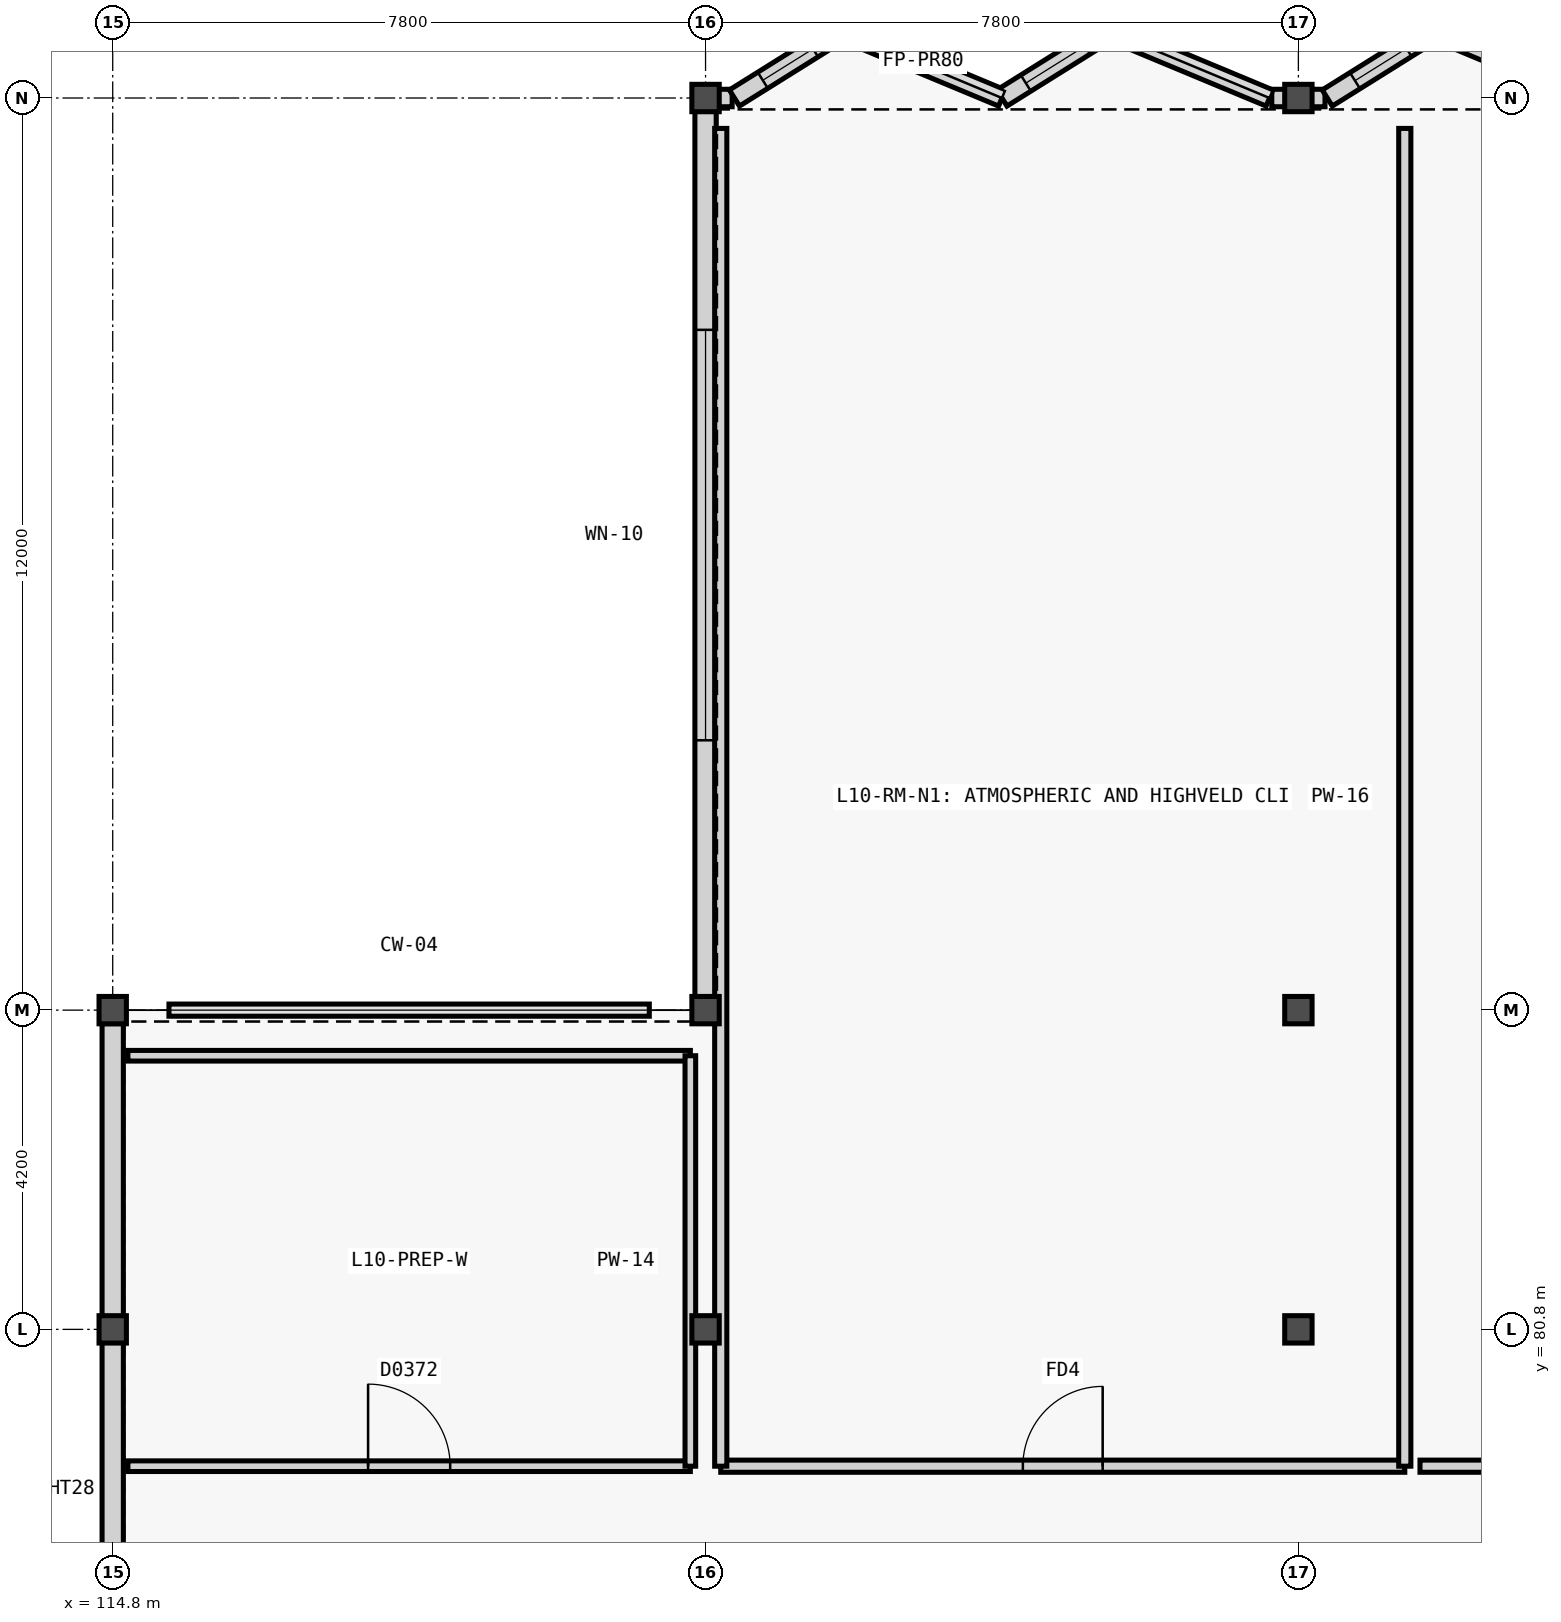
"""IFC4 building model, lengths in metres.
Left out: names, types, materials, properties, quantities, classifications, styles, units other than length and angle.
Written with IfcOpenShell. Run it as: python <this file> out.ifc"""

import sys

from ifc_helpers import new_model, si_unit, direction, frame, frame_2d, origin, origin_2d, place, context, subcontext, project, spatial, rectangle, extrude, element, fill, save


model = new_model("IFC4")
c1 = context("Model", 3, precision=1e-05, world=origin(), true_north=direction((0.0, 1.0)))
c2 = subcontext(c1, "Body", "Model", "MODEL_VIEW")
j1 = project(units=[si_unit("LENGTHUNIT", "METRE"), si_unit("PLANEANGLEUNIT", "RADIAN")], contexts=[c1])
p1 = place(None, origin())
s1 = spatial("IfcSite", under=j1, at=p1, CompositionType="ELEMENT")
p2 = place(p1, origin())
s2 = spatial("IfcBuilding", under=s1, at=p2, CompositionType="ELEMENT")
p3 = place(p2, frame((0.0, 0.0, 39.6)))
s3 = spatial("IfcBuildingStorey", under=s2, at=p3, CompositionType="ELEMENT", Elevation=39.6)
for number, where, z_axis, x_axis in (
    (1, (114.8, 80.8, 0.0), (0.0, 0.0, 1.0), (1.0, 0.0, 0.0)),
    (2, (114.8, 85.0, 0.0), (0.0, 0.0, 1.0), (1.0, 0.0, 0.0)),
    (3, (122.6, 80.8, 0.0), (0.0, 0.0, 1.0), (1.0, 0.0, 0.0)),
    (4, (122.6, 85.0, 0.0), (0.0, 0.0, 1.0), (1.0, 0.0, 0.0)),
    (5, (122.6, 97.0, 0.0), (0.0, 0.0, 1.0), (1.0, 0.0, 0.0)),
    (6, (130.4, 80.8, 0.0), (0.0, 0.0, 1.0), (1.0, 0.0, 0.0)),
    (7, (130.4, 85.0, 0.0), (0.0, 0.0, 1.0), (1.0, 0.0, 0.0)),
    (8, (130.4, 97.0, 0.0), (0.0, 0.0, 1.0), (1.0, 0.0, 0.0)),
):
    element("IfcColumn", number, at=place(p3, frame(where, z_axis=z_axis, x_axis=x_axis)), inside=s3, PredefinedType="COLUMN", context=c2, shape_type="SweptSolid", body=[
        extrude(rectangle(XDim=0.36, YDim=0.36, at=origin_2d()), origin(), (0.0, 0.0, 1.0), 3.6),
    ])
p4 = place(p3, frame((122.6, 85.178, 0.0), z_axis=(0.0, 0.0, 1.0), x_axis=(0.0, 1.0, 0.0)))
e9 = element("IfcWall", 9, at=p4, inside=s3, PredefinedType="SOLIDWALL", context=c2, shape_type="SweptSolid", body=[
    extrude(rectangle(XDim=11.644, YDim=0.28, at=frame_2d((5.822, 0.0))), origin(), (0.0, 0.0, 1.0), 2.89),
])
p5 = place(p4, frame((3.372, 0.0, 0.82)))
e10 = element("IfcOpeningElement", 10, at=p5, cuts=e9, PredefinedType="OPENING", context=c2, shape_type="SweptSolid", body=[
    extrude(rectangle(XDim=5.4, YDim=1.2, at=frame_2d((2.7, 0.6))), frame((0.0, 0.15, 0.0), z_axis=(0.0, -1.0, 0.0), x_axis=(1.0, 0.0, 0.0)), (0.0, 0.0, 1.0), 0.3),
])
p6 = place(p3, frame((114.8, 72.578, 0.0), z_axis=(0.0, 0.0, 1.0), x_axis=(0.0, 1.0, 0.0)))
e11 = element("IfcWall", 11, at=p6, inside=s3, PredefinedType="SOLIDWALL", context=c2, shape_type="SweptSolid", body=[
    extrude(rectangle(XDim=12.244, YDim=0.28, at=frame_2d((6.122, 0.0))), origin(), (0.0, 0.0, 1.0), 2.79),
])
for number, where, z_axis, x_axis in (
    (12, (122.6, 97.0, 0.0), (0.0, 0.0, 1.0), (1.0, 0.0, 0.0)),
    (13, (130.05, 97.0, 0.0), (0.0, 0.0, 1.0), (1.0, 0.0, 0.0)),
):
    element("IfcWall", number, at=place(p3, frame(where, z_axis=z_axis, x_axis=x_axis)), inside=s3, PredefinedType="SOLIDWALL", context=c2, shape_type="SweptSolid", body=[
        extrude(rectangle(XDim=0.35, YDim=0.23, at=frame_2d((0.175, 0.0))), origin(), (0.0, 0.0, 1.0), 3.36),
    ])
p7 = place(p3, frame((130.4, 97.0, 0.0), z_axis=(0.0, 0.0, 1.0), x_axis=(1.0, 0.0, 0.0)))
e14 = element("IfcWall", 14, at=p7, inside=s3, PredefinedType="SOLIDWALL", context=c2, shape_type="SweptSolid", body=[
    extrude(rectangle(XDim=0.35, YDim=0.23, at=frame_2d((0.175, 0.0))), origin(), (0.0, 0.0, 1.0), 3.36),
])
p8 = place(p3, frame((122.98, 97.0, 0.0), z_axis=(0.0, 0.0, 1.0), x_axis=(0.848023086369, 0.529959286158, 0.0)))
e15 = element("IfcWall", 15, at=p8, inside=s3, PredefinedType="SOLIDWALL", context=c2, shape_type="SweptSolid", body=[
    extrude(rectangle(XDim=1.66, YDim=0.25, at=frame_2d((0.83, 0.0))), origin(), (0.0, 0.0, 1.0), 3.36),
])
p9 = place(p8, frame((0.44, 0.0, 0.82)))
e16 = element("IfcOpeningElement", 16, at=p9, cuts=e15, PredefinedType="OPENING", context=c2, shape_type="SweptSolid", body=[
    extrude(rectangle(XDim=0.78, YDim=1.3, at=frame_2d((0.39, 0.65))), frame((0.0, 0.135, 0.0), z_axis=(0.0, -1.0, 0.0), x_axis=(1.0, 0.0, 0.0)), (0.0, 0.0, 1.0), 0.27),
])
p10 = place(p3, frame((124.388, 97.88, 0.0), z_axis=(0.0, 0.0, 1.0), x_axis=(0.92309902008, -0.384562347517, 0.0)))
e17 = element("IfcWall", 17, at=p10, inside=s3, PredefinedType="SOLIDWALL", context=c2, shape_type="SweptSolid", body=[
    extrude(rectangle(XDim=2.288, YDim=0.23, at=frame_2d((1.144, 0.0))), origin(), (0.0, 0.0, 1.0), 3.36),
])
p11 = place(p3, frame((126.5, 97.0, 0.0), z_axis=(0.0, 0.0, 1.0), x_axis=(0.848023086369, 0.529959286158, 0.0)))
e18 = element("IfcWall", 18, at=p11, inside=s3, PredefinedType="SOLIDWALL", context=c2, shape_type="SweptSolid", body=[
    extrude(rectangle(XDim=1.66, YDim=0.25, at=frame_2d((0.83, 0.0))), origin(), (0.0, 0.0, 1.0), 3.36),
])
p12 = place(p11, frame((0.37, 0.0, 0.82)))
e19 = element("IfcOpeningElement", 19, at=p12, cuts=e18, PredefinedType="OPENING", context=c2, shape_type="SweptSolid", body=[
    extrude(rectangle(XDim=0.92, YDim=1.38, at=frame_2d((0.46, 0.69))), frame((0.0, 0.135, 0.0), z_axis=(0.0, -1.0, 0.0), x_axis=(1.0, 0.0, 0.0)), (0.0, 0.0, 1.0), 0.27),
])
p13 = place(p3, frame((127.908, 97.88, 0.0), z_axis=(0.0, 0.0, 1.0), x_axis=(0.92309902008, -0.384562347517, 0.0)))
e20 = element("IfcWall", 20, at=p13, inside=s3, PredefinedType="SOLIDWALL", context=c2, shape_type="SweptSolid", body=[
    extrude(rectangle(XDim=2.288, YDim=0.23, at=frame_2d((1.144, 0.0))), origin(), (0.0, 0.0, 1.0), 3.36),
])
p14 = place(p3, frame((130.78, 97.0, 0.0), z_axis=(0.0, 0.0, 1.0), x_axis=(0.848023086369, 0.529959286158, 0.0)))
e21 = element("IfcWall", 21, at=p14, inside=s3, PredefinedType="SOLIDWALL", context=c2, shape_type="SweptSolid", body=[
    extrude(rectangle(XDim=1.66, YDim=0.25, at=frame_2d((0.83, 0.0))), origin(), (0.0, 0.0, 1.0), 3.36),
])
p15 = place(p14, frame((0.43, 0.0, 0.82)))
e22 = element("IfcOpeningElement", 22, at=p15, cuts=e21, PredefinedType="OPENING", context=c2, shape_type="SweptSolid", body=[
    extrude(rectangle(XDim=0.8, YDim=1.35, at=frame_2d((0.4, 0.675))), frame((0.0, 0.135, 0.0), z_axis=(0.0, -1.0, 0.0), x_axis=(1.0, 0.0, 0.0)), (0.0, 0.0, 1.0), 0.27),
])
p16 = place(p3, frame((132.188, 97.88, 0.0), z_axis=(0.0, 0.0, 1.0), x_axis=(0.92309902008, -0.384562347517, 0.0)))
e23 = element("IfcWall", 23, at=p16, inside=s3, PredefinedType="SOLIDWALL", context=c2, shape_type="SweptSolid", body=[
    extrude(rectangle(XDim=2.288, YDim=0.23, at=frame_2d((1.144, 0.0))), origin(), (0.0, 0.0, 1.0), 3.36),
])
p17 = place(p3, frame((115.0, 79.0, 0.0), z_axis=(0.0, 0.0, 1.0), x_axis=(1.0, 0.0, 0.0)))
e24 = element("IfcWall", 24, at=p17, inside=s3, PredefinedType="PARTITIONING", context=c2, shape_type="SweptSolid", body=[
    extrude(rectangle(XDim=7.4, YDim=0.14, at=frame_2d((3.7, 0.0))), origin(), (0.0, 0.0, 1.0), 3.34),
])
p18 = place(p17, frame((3.16, 0.0, 0.0)))
e25 = element("IfcOpeningElement", 25, at=p18, cuts=e24, PredefinedType="OPENING", context=c2, shape_type="SweptSolid", body=[
    extrude(rectangle(XDim=1.08, YDim=2.2, at=frame_2d((0.54, 1.1))), frame((0.0, 0.08, 0.0), z_axis=(0.0, -1.0, 0.0), x_axis=(1.0, 0.0, 0.0)), (0.0, 0.0, 1.0), 0.16),
])
p19 = place(p3, frame((115.0, 84.4, 0.0), z_axis=(0.0, 0.0, 1.0), x_axis=(1.0, 0.0, 0.0)))
e26 = element("IfcWall", 26, at=p19, inside=s3, PredefinedType="PARTITIONING", context=c2, shape_type="SweptSolid", body=[
    extrude(rectangle(XDim=7.4, YDim=0.14, at=frame_2d((3.7, 0.0))), origin(), (0.0, 0.0, 1.0), 3.34),
])
p20 = place(p3, frame((122.4, 79.0, 0.0), z_axis=(0.0, 0.0, 1.0), x_axis=(0.0, 1.0, 0.0)))
e27 = element("IfcWall", 27, at=p20, inside=s3, PredefinedType="PARTITIONING", context=c2, shape_type="SweptSolid", body=[
    extrude(rectangle(XDim=5.4, YDim=0.14, at=frame_2d((2.7, 0.0))), origin(), (0.0, 0.0, 1.0), 2.87),
])
p21 = place(p3, frame((122.8, 79.0, 0.0), z_axis=(0.0, 0.0, 1.0), x_axis=(1.0, 0.0, 0.0)))
e28 = element("IfcWall", 28, at=p21, inside=s3, PredefinedType="PARTITIONING", context=c2, shape_type="SweptSolid", body=[
    extrude(rectangle(XDim=9.0, YDim=0.16, at=frame_2d((4.5, 0.0))), origin(), (0.0, 0.0, 1.0), 3.34),
])
p22 = place(p21, frame((3.975, 0.0, 0.0)))
e29 = element("IfcOpeningElement", 29, at=p22, cuts=e28, PredefinedType="OPENING", context=c2, shape_type="SweptSolid", body=[
    extrude(rectangle(XDim=1.05, YDim=2.15, at=frame_2d((0.525, 1.075))), frame((0.0, 0.09, 0.0), z_axis=(0.0, -1.0, 0.0), x_axis=(1.0, 0.0, 0.0)), (0.0, 0.0, 1.0), 0.18),
])
p23 = place(p3, frame((122.8, 79.0, 0.0), z_axis=(0.0, 0.0, 1.0), x_axis=(0.0, 1.0, 0.0)))
e30 = element("IfcWall", 30, at=p23, inside=s3, PredefinedType="PARTITIONING", context=c2, shape_type="SweptSolid", body=[
    extrude(rectangle(XDim=17.6, YDim=0.16, at=frame_2d((8.8, 0.0))), origin(), (0.0, 0.0, 1.0), 2.87),
])
p24 = place(p3, frame((131.8, 79.0, 0.0), z_axis=(0.0, 0.0, 1.0), x_axis=(0.0, 1.0, 0.0)))
e31 = element("IfcWall", 31, at=p24, inside=s3, PredefinedType="PARTITIONING", context=c2, shape_type="SweptSolid", body=[
    extrude(rectangle(XDim=17.6, YDim=0.16, at=frame_2d((8.8, 0.0))), origin(), (0.0, 0.0, 1.0), 3.34),
])
p25 = place(p3, frame((132.0, 79.0, 0.0), z_axis=(0.0, 0.0, 1.0), x_axis=(1.0, 0.0, 0.0)))
e32 = element("IfcWall", 32, at=p25, inside=s3, PredefinedType="PARTITIONING", context=c2, shape_type="SweptSolid", body=[
    extrude(rectangle(XDim=9.8, YDim=0.16, at=frame_2d((4.9, 0.0))), origin(), (0.0, 0.0, 1.0), 3.34),
])
p26 = place(p25, frame((4.275, 0.0, 0.0)))
e33 = element("IfcOpeningElement", 33, at=p26, cuts=e32, PredefinedType="OPENING", context=c2, shape_type="SweptSolid", body=[
    extrude(rectangle(XDim=1.25, YDim=2.2, at=frame_2d((0.625, 1.1))), frame((0.0, 0.09, 0.0), z_axis=(0.0, -1.0, 0.0), x_axis=(1.0, 0.0, 0.0)), (0.0, 0.0, 1.0), 0.18),
])
p27 = place(p5, origin())
e34 = element("IfcWindow", 34, at=p27, inside=s3, PartitioningType="SINGLE_PANEL", PredefinedType="WINDOW", context=c2, shape_type="SweptSolid", body=[
    extrude(rectangle(XDim=5.4, YDim=1.2, at=frame_2d((2.7, 0.6))), frame((0.0, 0.03, 0.0), z_axis=(0.0, -1.0, 0.0), x_axis=(1.0, 0.0, 0.0)), (0.0, 0.0, 1.0), 0.06),
])
fill(e10, e34)
p28 = place(p9, origin())
e35 = element("IfcWindow", 35, at=p28, inside=s3, PartitioningType="SINGLE_PANEL", PredefinedType="WINDOW", context=c2, shape_type="SweptSolid", body=[
    extrude(rectangle(XDim=0.78, YDim=1.3, at=frame_2d((0.39, 0.65))), frame((0.0, 0.03, 0.0), z_axis=(0.0, -1.0, 0.0), x_axis=(1.0, 0.0, 0.0)), (0.0, 0.0, 1.0), 0.06),
])
fill(e16, e35)
p29 = place(p12, origin())
e36 = element("IfcWindow", 36, at=p29, inside=s3, PartitioningType="SINGLE_PANEL", PredefinedType="WINDOW", context=c2, shape_type="SweptSolid", body=[
    extrude(rectangle(XDim=0.92, YDim=1.38, at=frame_2d((0.46, 0.69))), frame((0.0, 0.03, 0.0), z_axis=(0.0, -1.0, 0.0), x_axis=(1.0, 0.0, 0.0)), (0.0, 0.0, 1.0), 0.06),
])
fill(e19, e36)
p30 = place(p15, origin())
e37 = element("IfcWindow", 37, at=p30, inside=s3, PartitioningType="SINGLE_PANEL", PredefinedType="WINDOW", context=c2, shape_type="SweptSolid", body=[
    extrude(rectangle(XDim=0.8, YDim=1.35, at=frame_2d((0.4, 0.675))), frame((0.0, 0.03, 0.0), z_axis=(0.0, -1.0, 0.0), x_axis=(1.0, 0.0, 0.0)), (0.0, 0.0, 1.0), 0.06),
])
fill(e22, e37)
p31 = place(p18, origin())
e38 = element("IfcDoor", 38, at=p31, inside=s3, OperationType="SINGLE_SWING_LEFT", PredefinedType="DOOR", context=c2, shape_type="SweptSolid", body=[
    extrude(rectangle(XDim=1.08, YDim=2.2, at=frame_2d((0.54, 1.1))), frame((0.0, 0.025, 0.0), z_axis=(0.0, -1.0, 0.0), x_axis=(1.0, 0.0, 0.0)), (0.0, 0.0, 1.0), 0.05),
])
fill(e25, e38)
p32 = place(p22, origin())
e39 = element("IfcDoor", 39, at=p32, inside=s3, OperationType="SINGLE_SWING_RIGHT", PredefinedType="DOOR", context=c2, shape_type="SweptSolid", body=[
    extrude(rectangle(XDim=1.05, YDim=2.15, at=frame_2d((0.525, 1.075))), frame((0.0, 0.025, 0.0), z_axis=(0.0, -1.0, 0.0), x_axis=(1.0, 0.0, 0.0)), (0.0, 0.0, 1.0), 0.05),
])
fill(e29, e39)
save(model, sys.argv[1])
